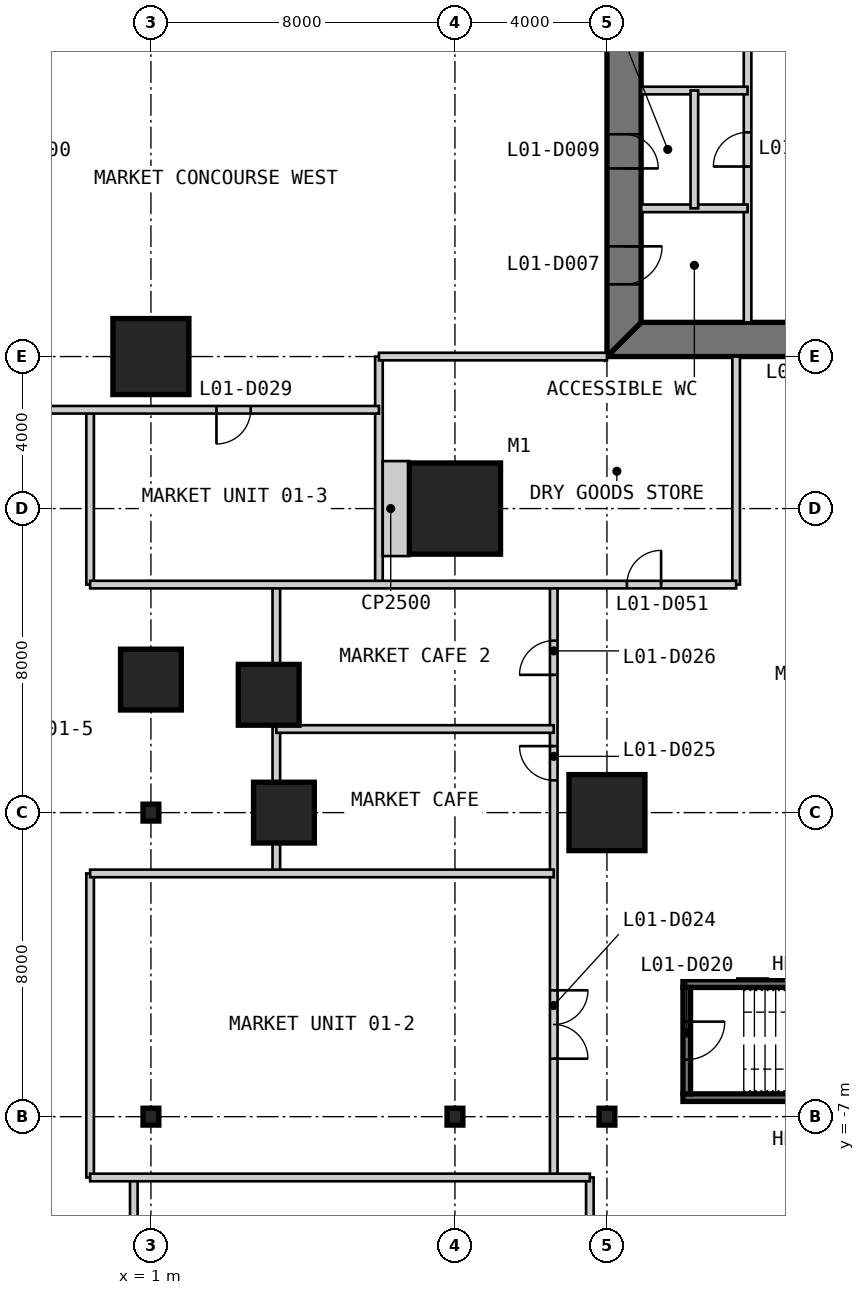
"""IFC4 building model, lengths in metres.
Left out: names, types, materials, properties, quantities, classifications, styles, units other than length and angle.
Written with IfcOpenShell. Run it as: python <this file> out.ifc"""

import sys

from ifc_helpers import new_model, si_unit, direction, frame, frame_2d, origin, origin_2d, place, context, subcontext, project, spatial, polyline, rectangle, i_section, outline, extrude, element, fill, save


model = new_model("IFC4")
c1 = context("Model", 3, precision=1e-05, world=origin(), true_north=direction((0.0, 1.0)))
c2 = subcontext(c1, "Body", "Model", "MODEL_VIEW")
j1 = project(units=[si_unit("LENGTHUNIT", "METRE"), si_unit("PLANEANGLEUNIT", "RADIAN")], contexts=[c1])
p1 = place(None, origin())
s1 = spatial("IfcSite", under=j1, at=p1, CompositionType="ELEMENT")
p2 = place(p1, origin())
s2 = spatial("IfcBuilding", under=s1, at=p2, CompositionType="ELEMENT")
p3 = place(p2, frame((0.0, 0.0, 7.0)))
s3 = spatial("IfcBuildingStorey", under=s2, at=p3, CompositionType="ELEMENT", Elevation=7.0)
p4 = place(p3, frame((9.0, 9.0, 0.0), z_axis=(0.0, 0.0, 1.0), x_axis=(1.0, 0.0, 0.0)))
e1 = element("IfcColumn", 1, at=p4, inside=s3, PredefinedType="COLUMN", context=c2, shape_type="SweptSolid", body=[
    extrude(rectangle(XDim=2.4, YDim=2.4, at=origin_2d()), origin(), (0.0, 0.0, 1.0), 4.8),
])
p5 = place(p3, frame((4.5, 1.0, 0.0), z_axis=(0.0, 0.0, 1.0), x_axis=(1.0, 0.0, 0.0)))
e2 = element("IfcColumn", 2, at=p5, inside=s3, PredefinedType="COLUMN", context=c2, shape_type="SweptSolid", body=[
    extrude(rectangle(XDim=1.6, YDim=1.6, at=origin_2d()), origin(), (0.0, 0.0, 1.0), 4.8),
])
for number, where, z_axis, x_axis in (
    (3, (13.0, 1.0, 0.0), (0.0, 0.0, 1.0), (1.0, 0.0, 0.0)),
    (4, (1.0, 13.0, 0.0), (0.0, 0.0, 1.0), (1.0, 0.0, 0.0)),
):
    element("IfcColumn", number, at=place(p3, frame(where, z_axis=z_axis, x_axis=x_axis)), inside=s3, PredefinedType="COLUMN", context=c2, shape_type="SweptSolid", body=[
        extrude(rectangle(XDim=2.0, YDim=2.0, at=origin_2d()), origin(), (0.0, 0.0, 1.0), 4.8),
    ])
for number, where, z_axis, x_axis in (
    (5, (1.0, 4.5, 0.0), (0.0, 0.0, 1.0), (1.0, 0.0, 0.0)),
    (6, (4.1, 4.1, 0.0), (0.0, 0.0, 1.0), (1.0, 0.0, 0.0)),
):
    element("IfcColumn", number, at=place(p3, frame(where, z_axis=z_axis, x_axis=x_axis)), inside=s3, PredefinedType="COLUMN", context=c2, shape_type="SweptSolid", body=[
        extrude(rectangle(XDim=1.6, YDim=1.6, at=origin_2d()), origin(), (0.0, 0.0, 1.0), 4.8),
    ])
for number, where, z_axis, x_axis in (
    (7, (1.0, -7.0, 0.0), (0.0, 0.0, 1.0), (1.0, 0.0, 0.0)),
    (8, (1.0, 1.0, 0.0), (0.0, 0.0, 1.0), (1.0, 0.0, 0.0)),
    (9, (9.0, -7.0, 0.0), (0.0, 0.0, 1.0), (1.0, 0.0, 0.0)),
    (10, (13.0, -7.0, 0.0), (0.0, 0.0, 1.0), (1.0, 0.0, 0.0)),
):
    element("IfcColumn", number, at=place(p3, frame(where, z_axis=z_axis, x_axis=x_axis)), inside=s3, PredefinedType="COLUMN", context=c2, shape_type="SweptSolid", body=[
        extrude(i_section(OverallWidth=0.417, OverallDepth=0.445, WebThickness=0.039, FlangeThickness=0.063, at=origin_2d()), origin(), (0.0, 0.0, 1.0), 4.8),
    ])
p6 = place(p3, frame((13.0, 13.45, 0.0), z_axis=(0.0, 0.0, 1.0), x_axis=(1.0, 0.0, 0.0)))
e11 = element("IfcWall", 11, at=p6, inside=s3, PredefinedType="SHEAR", context=c2, shape_type="SweptSolid", body=[
    extrude(outline(polyline([(0.0, -0.45), (24.0, -0.45), (23.1, 0.45), (0.9, 0.45), (0.0, -0.45)])), origin(), (0.0, 0.0, 1.0), 4.8),
])
p7 = place(p6, frame((4.9, 0.0, 0.0)))
e12 = element("IfcOpeningElement", 12, at=p7, cuts=e11, PredefinedType="OPENING", context=c2, shape_type="SweptSolid", body=[
    extrude(rectangle(XDim=1.0, YDim=2.2, at=frame_2d((0.5, 1.1))), frame((0.0, 0.46, 0.0), z_axis=(0.0, -1.0, 0.0), x_axis=(1.0, 0.0, 0.0)), (0.0, 0.0, 1.0), 0.92),
])
p8 = place(p6, frame((8.9, 0.0, 0.0)))
e13 = element("IfcOpeningElement", 13, at=p8, cuts=e11, PredefinedType="OPENING", context=c2, shape_type="SweptSolid", body=[
    extrude(rectangle(XDim=1.1, YDim=2.2, at=frame_2d((0.55, 1.1))), frame((0.0, 0.46, 0.0), z_axis=(0.0, -1.0, 0.0), x_axis=(1.0, 0.0, 0.0)), (0.0, 0.0, 1.0), 0.92),
])
p9 = place(p6, frame((15.05, 0.0, 0.0)))
e14 = element("IfcOpeningElement", 14, at=p9, cuts=e11, PredefinedType="OPENING", context=c2, shape_type="SweptSolid", body=[
    extrude(rectangle(XDim=0.9, YDim=2.2, at=frame_2d((0.45, 1.1))), frame((0.0, 0.46, 0.0), z_axis=(0.0, -1.0, 0.0), x_axis=(1.0, 0.0, 0.0)), (0.0, 0.0, 1.0), 0.92),
])
p10 = place(p6, frame((17.9, 0.0, 0.0)))
e15 = element("IfcOpeningElement", 15, at=p10, cuts=e11, PredefinedType="OPENING", context=c2, shape_type="SweptSolid", body=[
    extrude(rectangle(XDim=1.0, YDim=2.2, at=frame_2d((0.5, 1.1))), frame((0.0, 0.46, 0.0), z_axis=(0.0, -1.0, 0.0), x_axis=(1.0, 0.0, 0.0)), (0.0, 0.0, 1.0), 0.92),
])
p11 = place(p6, frame((21.4, 0.0, 0.0)))
e16 = element("IfcOpeningElement", 16, at=p11, cuts=e11, PredefinedType="OPENING", context=c2, shape_type="SweptSolid", body=[
    extrude(rectangle(XDim=1.0, YDim=2.2, at=frame_2d((0.5, 1.1))), frame((0.0, 0.46, 0.0), z_axis=(0.0, -1.0, 0.0), x_axis=(1.0, 0.0, 0.0)), (0.0, 0.0, 1.0), 0.92),
])
p12 = place(p3, frame((13.45, 36.1, 0.0), z_axis=(0.0, 0.0, 1.0), x_axis=(0.0, -1.0, 0.0)))
e17 = element("IfcWall", 17, at=p12, inside=s3, PredefinedType="SHEAR", context=c2, shape_type="SweptSolid", body=[
    extrude(outline(polyline([(-0.9, -0.45), (23.1, -0.45), (22.2, 0.45), (0.0, 0.45), (-0.9, -0.45)])), origin(), (0.0, 0.0, 1.0), 4.8),
])
p13 = place(p12, frame((20.2, 0.0, 0.0)))
e18 = element("IfcOpeningElement", 18, at=p13, cuts=e17, PredefinedType="OPENING", context=c2, shape_type="SweptSolid", body=[
    extrude(rectangle(XDim=1.0, YDim=2.2, at=frame_2d((0.5, 1.1))), frame((0.0, 0.46, 0.0), z_axis=(0.0, -1.0, 0.0), x_axis=(1.0, 0.0, 0.0)), (0.0, 0.0, 1.0), 0.92),
])
p14 = place(p12, frame((17.25, 0.0, 0.0)))
e19 = element("IfcOpeningElement", 19, at=p14, cuts=e17, PredefinedType="OPENING", context=c2, shape_type="SweptSolid", body=[
    extrude(rectangle(XDim=0.9, YDim=2.2, at=frame_2d((0.45, 1.1))), frame((0.0, 0.46, 0.0), z_axis=(0.0, -1.0, 0.0), x_axis=(1.0, 0.0, 0.0)), (0.0, 0.0, 1.0), 0.92),
])
p15 = place(p3, frame((16.7, 13.9, 0.0), z_axis=(0.0, 0.0, 1.0), x_axis=(0.0, 1.0, 0.0)))
e20 = element("IfcWall", 20, at=p15, inside=s3, PredefinedType="PARTITIONING", context=c2, shape_type="SweptSolid", body=[
    extrude(rectangle(XDim=16.1, YDim=0.2, at=frame_2d((8.05, 0.0))), origin(), (0.0, 0.0, 1.0), 4.6),
])
p16 = place(p15, frame((4.1, 0.0, 0.0)))
e21 = element("IfcOpeningElement", 21, at=p16, cuts=e20, PredefinedType="OPENING", context=c2, shape_type="SweptSolid", body=[
    extrude(rectangle(XDim=0.9, YDim=2.2, at=frame_2d((0.45, 1.1))), frame((0.0, 0.11, 0.0), z_axis=(0.0, -1.0, 0.0), x_axis=(1.0, 0.0, 0.0)), (0.0, 0.0, 1.0), 0.22),
])
for number, where, z_axis, x_axis in (
    (22, (13.9, 20.0, 0.0), (0.0, 0.0, 1.0), (1.0, 0.0, 0.0)),
    (23, (13.9, 16.9, 0.0), (0.0, 0.0, 1.0), (1.0, 0.0, 0.0)),
):
    element("IfcWall", number, at=place(p3, frame(where, z_axis=z_axis, x_axis=x_axis)), inside=s3, PredefinedType="PARTITIONING", context=c2, shape_type="SweptSolid", body=[
        extrude(rectangle(XDim=2.8, YDim=0.2, at=frame_2d((1.4, 0.0))), origin(), (0.0, 0.0, 1.0), 4.6),
    ])
p17 = place(p3, frame((15.3, 16.9, 0.0), z_axis=(0.0, 0.0, 1.0), x_axis=(0.0, 1.0, 0.0)))
e24 = element("IfcWall", 24, at=p17, inside=s3, PredefinedType="PARTITIONING", context=c2, shape_type="SweptSolid", body=[
    extrude(rectangle(XDim=3.1, YDim=0.2, at=frame_2d((1.55, 0.0))), origin(), (0.0, 0.0, 1.0), 4.6),
])
for number, where, z_axis, x_axis in (
    (25, (15.0, -6.5, 0.0), (0.0, 0.0, 1.0), (1.0, 0.0, 0.0)),
    (26, (23.4, -3.5, 0.0), (0.0, 0.0, 1.0), (-1.0, 0.0, 0.0)),
):
    element("IfcWall", number, at=place(p3, frame(where, z_axis=z_axis, x_axis=x_axis)), inside=s3, PredefinedType="SOLIDWALL", context=c2, shape_type="SweptSolid", body=[
        extrude(rectangle(XDim=8.4, YDim=0.2, at=frame_2d((4.2, 0.0))), origin(), (0.0, 0.0, 1.0), 4.8),
    ])
p18 = place(p3, frame((15.1, -3.6, 0.0), z_axis=(0.0, 0.0, 1.0), x_axis=(0.0, -1.0, 0.0)))
e27 = element("IfcWall", 27, at=p18, inside=s3, PredefinedType="SOLIDWALL", context=c2, shape_type="SweptSolid", body=[
    extrude(rectangle(XDim=2.8, YDim=0.2, at=frame_2d((1.4, 0.0))), origin(), (0.0, 0.0, 1.0), 4.8),
])
p19 = place(p18, frame((0.9, 0.0, 0.0)))
e28 = element("IfcOpeningElement", 28, at=p19, cuts=e27, PredefinedType="OPENING", context=c2, shape_type="SweptSolid", body=[
    extrude(rectangle(XDim=1.0, YDim=2.2, at=frame_2d((0.5, 1.1))), frame((0.0, 0.11, 0.0), z_axis=(0.0, -1.0, 0.0), x_axis=(1.0, 0.0, 0.0)), (0.0, 0.0, 1.0), 0.22),
])
p20 = place(p3, frame((-0.6, -8.6, 0.0), z_axis=(0.0, 0.0, 1.0), x_axis=(0.0, 1.0, 0.0)))
e29 = element("IfcWall", 29, at=p20, inside=s3, PredefinedType="PARTITIONING", context=c2, shape_type="SweptSolid", body=[
    extrude(rectangle(XDim=8.0, YDim=0.2, at=frame_2d((4.0, 0.0))), origin(), (0.0, 0.0, 1.0), 4.5),
])
p21 = place(p3, frame((-0.6, 7.0, 0.0), z_axis=(0.0, 0.0, 1.0), x_axis=(0.0, 1.0, 0.0)))
e30 = element("IfcWall", 30, at=p21, inside=s3, PredefinedType="PARTITIONING", context=c2, shape_type="SweptSolid", body=[
    extrude(rectangle(XDim=4.6, YDim=0.2, at=frame_2d((2.3, 0.0))), origin(), (0.0, 0.0, 1.0), 4.5),
])
p22 = place(p3, frame((0.55, -15.25, 0.0), z_axis=(0.0, 0.0, 1.0), x_axis=(0.0, 1.0, 0.0)))
e31 = element("IfcWall", 31, at=p22, inside=s3, PredefinedType="PARTITIONING", context=c2, shape_type="SweptSolid", body=[
    extrude(rectangle(XDim=6.65, YDim=0.2, at=frame_2d((3.325, 0.0))), origin(), (0.0, 0.0, 1.0), 4.5),
])
p23 = place(p3, frame((4.3, -0.6, 0.0), z_axis=(0.0, 0.0, 1.0), x_axis=(0.0, 1.0, 0.0)))
e32 = element("IfcWall", 32, at=p23, inside=s3, PredefinedType="PARTITIONING", context=c2, shape_type="SweptSolid", body=[
    extrude(rectangle(XDim=0.8, YDim=0.2, at=frame_2d((0.4, 0.0))), origin(), (0.0, 0.0, 1.0), 4.5),
])
p24 = place(p3, frame((4.3, 1.8, 0.0), z_axis=(0.0, 0.0, 1.0), x_axis=(0.0, 1.0, 0.0)))
e33 = element("IfcWall", 33, at=p24, inside=s3, PredefinedType="PARTITIONING", context=c2, shape_type="SweptSolid", body=[
    extrude(rectangle(XDim=1.5, YDim=0.2, at=frame_2d((0.75, 0.0))), origin(), (0.0, 0.0, 1.0), 3.65),
])
p25 = place(p3, frame((4.3, 4.9, 0.0), z_axis=(0.0, 0.0, 1.0), x_axis=(0.0, 1.0, 0.0)))
e34 = element("IfcWall", 34, at=p25, inside=s3, PredefinedType="PARTITIONING", context=c2, shape_type="SweptSolid", body=[
    extrude(rectangle(XDim=2.1, YDim=0.2, at=frame_2d((1.05, 0.0))), origin(), (0.0, 0.0, 1.0), 4.5),
])
p26 = place(p3, frame((7.0, 7.0, 0.0), z_axis=(0.0, 0.0, 1.0), x_axis=(0.0, 1.0, 0.0)))
e35 = element("IfcWall", 35, at=p26, inside=s3, PredefinedType="PARTITIONING", context=c2, shape_type="SweptSolid", body=[
    extrude(rectangle(XDim=6.0, YDim=0.2, at=frame_2d((3.0, 0.0))), origin(), (0.0, 0.0, 1.0), 4.5),
])
p27 = place(p3, frame((11.6, -8.6, 0.0), z_axis=(0.0, 0.0, 1.0), x_axis=(0.0, 1.0, 0.0)))
e36 = element("IfcWall", 36, at=p27, inside=s3, PredefinedType="PARTITIONING", context=c2, shape_type="SweptSolid", body=[
    extrude(rectangle(XDim=15.6, YDim=0.2, at=frame_2d((7.8, 0.0))), origin(), (0.0, 0.0, 1.0), 4.5),
])
p28 = place(p27, frame((3.125, 0.0, 0.0)))
e37 = element("IfcOpeningElement", 37, at=p28, cuts=e36, PredefinedType="OPENING", context=c2, shape_type="SweptSolid", body=[
    extrude(rectangle(XDim=1.8, YDim=2.4, at=frame_2d((0.9, 1.2))), frame((0.0, 0.11, 0.0), z_axis=(0.0, -1.0, 0.0), x_axis=(1.0, 0.0, 0.0)), (0.0, 0.0, 1.0), 0.22),
])
p29 = place(p27, frame((10.45, 0.0, 0.0)))
e38 = element("IfcOpeningElement", 38, at=p29, cuts=e36, PredefinedType="OPENING", context=c2, shape_type="SweptSolid", body=[
    extrude(rectangle(XDim=0.9, YDim=2.2, at=frame_2d((0.45, 1.1))), frame((0.0, 0.11, 0.0), z_axis=(0.0, -1.0, 0.0), x_axis=(1.0, 0.0, 0.0)), (0.0, 0.0, 1.0), 0.22),
])
p30 = place(p27, frame((13.225, 0.0, 0.0)))
e39 = element("IfcOpeningElement", 39, at=p30, cuts=e36, PredefinedType="OPENING", context=c2, shape_type="SweptSolid", body=[
    extrude(rectangle(XDim=0.9, YDim=2.2, at=frame_2d((0.45, 1.1))), frame((0.0, 0.11, 0.0), z_axis=(0.0, -1.0, 0.0), x_axis=(1.0, 0.0, 0.0)), (0.0, 0.0, 1.0), 0.22),
])
p31 = place(p3, frame((12.55, -15.25, 0.0), z_axis=(0.0, 0.0, 1.0), x_axis=(0.0, 1.0, 0.0)))
e40 = element("IfcWall", 40, at=p31, inside=s3, PredefinedType="PARTITIONING", context=c2, shape_type="SweptSolid", body=[
    extrude(rectangle(XDim=6.65, YDim=0.2, at=frame_2d((3.325, 0.0))), origin(), (0.0, 0.0, 1.0), 4.5),
])
p32 = place(p31, frame((2.425, 0.0, 0.0)))
e41 = element("IfcOpeningElement", 41, at=p32, cuts=e40, PredefinedType="OPENING", context=c2, shape_type="SweptSolid", body=[
    extrude(rectangle(XDim=1.8, YDim=2.4, at=frame_2d((0.9, 1.2))), frame((0.0, 0.11, 0.0), z_axis=(0.0, -1.0, 0.0), x_axis=(1.0, 0.0, 0.0)), (0.0, 0.0, 1.0), 0.22),
])
p33 = place(p3, frame((16.4, 7.0, 0.0), z_axis=(0.0, 0.0, 1.0), x_axis=(0.0, 1.0, 0.0)))
e42 = element("IfcWall", 42, at=p33, inside=s3, PredefinedType="PARTITIONING", context=c2, shape_type="SweptSolid", body=[
    extrude(rectangle(XDim=6.0, YDim=0.2, at=frame_2d((3.0, 0.0))), origin(), (0.0, 0.0, 1.0), 4.5),
])
p34 = place(p3, frame((-0.6, -8.6, 0.0), z_axis=(0.0, 0.0, 1.0), x_axis=(1.0, 0.0, 0.0)))
e43 = element("IfcWall", 43, at=p34, inside=s3, PredefinedType="PARTITIONING", context=c2, shape_type="SweptSolid", body=[
    extrude(rectangle(XDim=13.15, YDim=0.2, at=frame_2d((6.575, 0.0))), origin(), (0.0, 0.0, 1.0), 4.5),
])
p35 = place(p3, frame((-0.6, -0.6, 0.0), z_axis=(0.0, 0.0, 1.0), x_axis=(1.0, 0.0, 0.0)))
e44 = element("IfcWall", 44, at=p35, inside=s3, PredefinedType="PARTITIONING", context=c2, shape_type="SweptSolid", body=[
    extrude(rectangle(XDim=12.2, YDim=0.2, at=frame_2d((6.1, 0.0))), origin(), (0.0, 0.0, 1.0), 4.5),
])
p36 = place(p3, frame((4.3, 3.2, 0.0), z_axis=(0.0, 0.0, 1.0), x_axis=(1.0, 0.0, 0.0)))
e45 = element("IfcWall", 45, at=p36, inside=s3, PredefinedType="PARTITIONING", context=c2, shape_type="SweptSolid", body=[
    extrude(rectangle(XDim=7.3, YDim=0.2, at=frame_2d((3.65, 0.0))), origin(), (0.0, 0.0, 1.0), 4.5),
])
p37 = place(p3, frame((-0.6, 7.0, 0.0), z_axis=(0.0, 0.0, 1.0), x_axis=(1.0, 0.0, 0.0)))
e46 = element("IfcWall", 46, at=p37, inside=s3, PredefinedType="PARTITIONING", context=c2, shape_type="SweptSolid", body=[
    extrude(rectangle(XDim=17.0, YDim=0.2, at=frame_2d((8.5, 0.0))), origin(), (0.0, 0.0, 1.0), 4.5),
])
p38 = place(p37, frame((14.125, 0.0, 0.0)))
e47 = element("IfcOpeningElement", 47, at=p38, cuts=e46, PredefinedType="OPENING", context=c2, shape_type="SweptSolid", body=[
    extrude(rectangle(XDim=0.9, YDim=2.2, at=frame_2d((0.45, 1.1))), frame((0.0, 0.11, 0.0), z_axis=(0.0, -1.0, 0.0), x_axis=(1.0, 0.0, 0.0)), (0.0, 0.0, 1.0), 0.22),
])
p39 = place(p3, frame((-15.25, 11.6, 0.0), z_axis=(0.0, 0.0, 1.0), x_axis=(1.0, 0.0, 0.0)))
e48 = element("IfcWall", 48, at=p39, inside=s3, PredefinedType="PARTITIONING", context=c2, shape_type="SweptSolid", body=[
    extrude(rectangle(XDim=22.25, YDim=0.2, at=frame_2d((11.125, 0.0))), origin(), (0.0, 0.0, 1.0), 4.5),
])
p40 = place(p39, frame((10.325, 0.0, 0.0)))
e49 = element("IfcOpeningElement", 49, at=p40, cuts=e48, PredefinedType="OPENING", context=c2, shape_type="SweptSolid", body=[
    extrude(rectangle(XDim=1.8, YDim=2.4, at=frame_2d((0.9, 1.2))), frame((0.0, 0.11, 0.0), z_axis=(0.0, -1.0, 0.0), x_axis=(1.0, 0.0, 0.0)), (0.0, 0.0, 1.0), 0.22),
])
p41 = place(p39, frame((3.025, 0.0, 0.0)))
e50 = element("IfcOpeningElement", 50, at=p41, cuts=e48, PredefinedType="OPENING", context=c2, shape_type="SweptSolid", body=[
    extrude(rectangle(XDim=1.8, YDim=2.4, at=frame_2d((0.9, 1.2))), frame((0.0, 0.11, 0.0), z_axis=(0.0, -1.0, 0.0), x_axis=(1.0, 0.0, 0.0)), (0.0, 0.0, 1.0), 0.22),
])
p42 = place(p39, frame((17.975, 0.0, 0.0)))
e51 = element("IfcOpeningElement", 51, at=p42, cuts=e48, PredefinedType="OPENING", context=c2, shape_type="SweptSolid", body=[
    extrude(rectangle(XDim=0.9, YDim=2.2, at=frame_2d((0.45, 1.1))), frame((0.0, 0.11, 0.0), z_axis=(0.0, -1.0, 0.0), x_axis=(1.0, 0.0, 0.0)), (0.0, 0.0, 1.0), 0.22),
])
p43 = place(p3, frame((7.0, 13.0, 0.0), z_axis=(0.0, 0.0, 1.0), x_axis=(1.0, 0.0, 0.0)))
e52 = element("IfcWall", 52, at=p43, inside=s3, PredefinedType="PARTITIONING", context=c2, shape_type="SweptSolid", body=[
    extrude(rectangle(XDim=6.0, YDim=0.2, at=frame_2d((3.0, 0.0))), origin(), (0.0, 0.0, 1.0), 3.653),
])
p44 = place(p3, frame((7.1, 9.0, 0.0), z_axis=(0.0, 0.0, 1.0), x_axis=(1.0, 0.0, 0.0)))
e53 = element("IfcWall", 53, at=p44, inside=s3, PredefinedType="PARTITIONING", context=c2, shape_type="SweptSolid", body=[
    extrude(rectangle(XDim=0.7, YDim=2.5, at=frame_2d((0.35, 0.0))), origin(), (0.0, 0.0, 1.0), 4.5),
])
p45 = place(p13, origin())
e54 = element("IfcDoor", 54, at=p45, inside=s3, OperationType="SINGLE_SWING_LEFT", PredefinedType="DOOR", context=c2, shape_type="SweptSolid", body=[
    extrude(rectangle(XDim=1.0, YDim=2.2, at=frame_2d((0.5, 1.1))), frame((0.0, 0.025, 0.0), z_axis=(0.0, -1.0, 0.0), x_axis=(1.0, 0.0, 0.0)), (0.0, 0.0, 1.0), 0.05),
    extrude(outline(polyline([(0.0, 0.0), (0.04, 0.0), (0.04, 2.16), (0.96, 2.16), (0.96, 0.0), (1.0, 0.0), (1.0, 2.2), (0.0, 2.2), (0.0, 0.0)])), frame((0.0, 0.3, 0.0), z_axis=(0.0, -1.0, 0.0), x_axis=(1.0, 0.0, 0.0)), (0.0, 0.0, 1.0), 0.6),
])
fill(e18, e54)
p46 = place(p16, origin())
e55 = element("IfcDoor", 55, at=p46, inside=s3, OperationType="SINGLE_SWING_LEFT", PredefinedType="DOOR", context=c2, shape_type="SweptSolid", body=[
    extrude(rectangle(XDim=0.9, YDim=2.2, at=frame_2d((0.45, 1.1))), frame((0.0, 0.025, 0.0), z_axis=(0.0, -1.0, 0.0), x_axis=(1.0, 0.0, 0.0)), (0.0, 0.0, 1.0), 0.05),
])
fill(e21, e55)
p47 = place(p14, origin())
e56 = element("IfcDoor", 56, at=p47, inside=s3, OperationType="SINGLE_SWING_RIGHT", PredefinedType="DOOR", context=c2, shape_type="SweptSolid", body=[
    extrude(rectangle(XDim=0.9, YDim=2.2, at=frame_2d((0.45, 1.1))), frame((0.0, 0.025, 0.0), z_axis=(0.0, -1.0, 0.0), x_axis=(1.0, 0.0, 0.0)), (0.0, 0.0, 1.0), 0.05),
    extrude(outline(polyline([(0.0, 0.0), (0.04, 0.0), (0.04, 2.16), (0.86, 2.16), (0.86, 0.0), (0.9, 0.0), (0.9, 2.2), (0.0, 2.2), (0.0, 0.0)])), frame((0.0, 0.3, 0.0), z_axis=(0.0, -1.0, 0.0), x_axis=(1.0, 0.0, 0.0)), (0.0, 0.0, 1.0), 0.6),
])
fill(e19, e56)
p48 = place(p19, origin())
e57 = element("IfcDoor", 57, at=p48, inside=s3, OperationType="SINGLE_SWING_LEFT", PredefinedType="DOOR", context=c2, shape_type="SweptSolid", body=[
    extrude(rectangle(XDim=1.0, YDim=2.2, at=frame_2d((0.5, 1.1))), frame((0.0, 0.025, 0.0), z_axis=(0.0, -1.0, 0.0), x_axis=(1.0, 0.0, 0.0)), (0.0, 0.0, 1.0), 0.05),
])
fill(e28, e57)
p49 = place(p28, frame((1.8, 0.0, 0.0), z_axis=(0.0, 0.0, 1.0), x_axis=(-1.0, 0.0, 0.0)))
e58 = element("IfcDoor", 58, at=p49, inside=s3, OperationType="DOUBLE_DOOR_SINGLE_SWING", PredefinedType="DOOR", context=c2, shape_type="SweptSolid", body=[
    extrude(rectangle(XDim=1.8, YDim=2.4, at=frame_2d((0.9, 1.2))), frame((0.0, 0.025, 0.0), z_axis=(0.0, -1.0, 0.0), x_axis=(1.0, 0.0, 0.0)), (0.0, 0.0, 1.0), 0.05),
])
fill(e37, e58)
p50 = place(p29, origin())
e59 = element("IfcDoor", 59, at=p50, inside=s3, OperationType="SINGLE_SWING_RIGHT", PredefinedType="DOOR", context=c2, shape_type="SweptSolid", body=[
    extrude(rectangle(XDim=0.9, YDim=2.2, at=frame_2d((0.45, 1.1))), frame((0.0, 0.025, 0.0), z_axis=(0.0, -1.0, 0.0), x_axis=(1.0, 0.0, 0.0)), (0.0, 0.0, 1.0), 0.05),
])
fill(e38, e59)
p51 = place(p30, origin())
e60 = element("IfcDoor", 60, at=p51, inside=s3, OperationType="SINGLE_SWING_LEFT", PredefinedType="DOOR", context=c2, shape_type="SweptSolid", body=[
    extrude(rectangle(XDim=0.9, YDim=2.2, at=frame_2d((0.45, 1.1))), frame((0.0, 0.025, 0.0), z_axis=(0.0, -1.0, 0.0), x_axis=(1.0, 0.0, 0.0)), (0.0, 0.0, 1.0), 0.05),
])
fill(e39, e60)
p52 = place(p42, frame((0.9, 0.0, 0.0), z_axis=(0.0, 0.0, 1.0), x_axis=(-1.0, 0.0, 0.0)))
e61 = element("IfcDoor", 61, at=p52, inside=s3, OperationType="SINGLE_SWING_RIGHT", PredefinedType="DOOR", context=c2, shape_type="SweptSolid", body=[
    extrude(rectangle(XDim=0.9, YDim=2.2, at=frame_2d((0.45, 1.1))), frame((0.0, 0.025, 0.0), z_axis=(0.0, -1.0, 0.0), x_axis=(1.0, 0.0, 0.0)), (0.0, 0.0, 1.0), 0.05),
])
fill(e51, e61)
p53 = place(p38, origin())
e62 = element("IfcDoor", 62, at=p53, inside=s3, OperationType="SINGLE_SWING_RIGHT", PredefinedType="DOOR", context=c2, shape_type="SweptSolid", body=[
    extrude(rectangle(XDim=0.9, YDim=2.2, at=frame_2d((0.45, 1.1))), frame((0.0, 0.025, 0.0), z_axis=(0.0, -1.0, 0.0), x_axis=(1.0, 0.0, 0.0)), (0.0, 0.0, 1.0), 0.05),
])
fill(e47, e62)
save(model, sys.argv[1])
